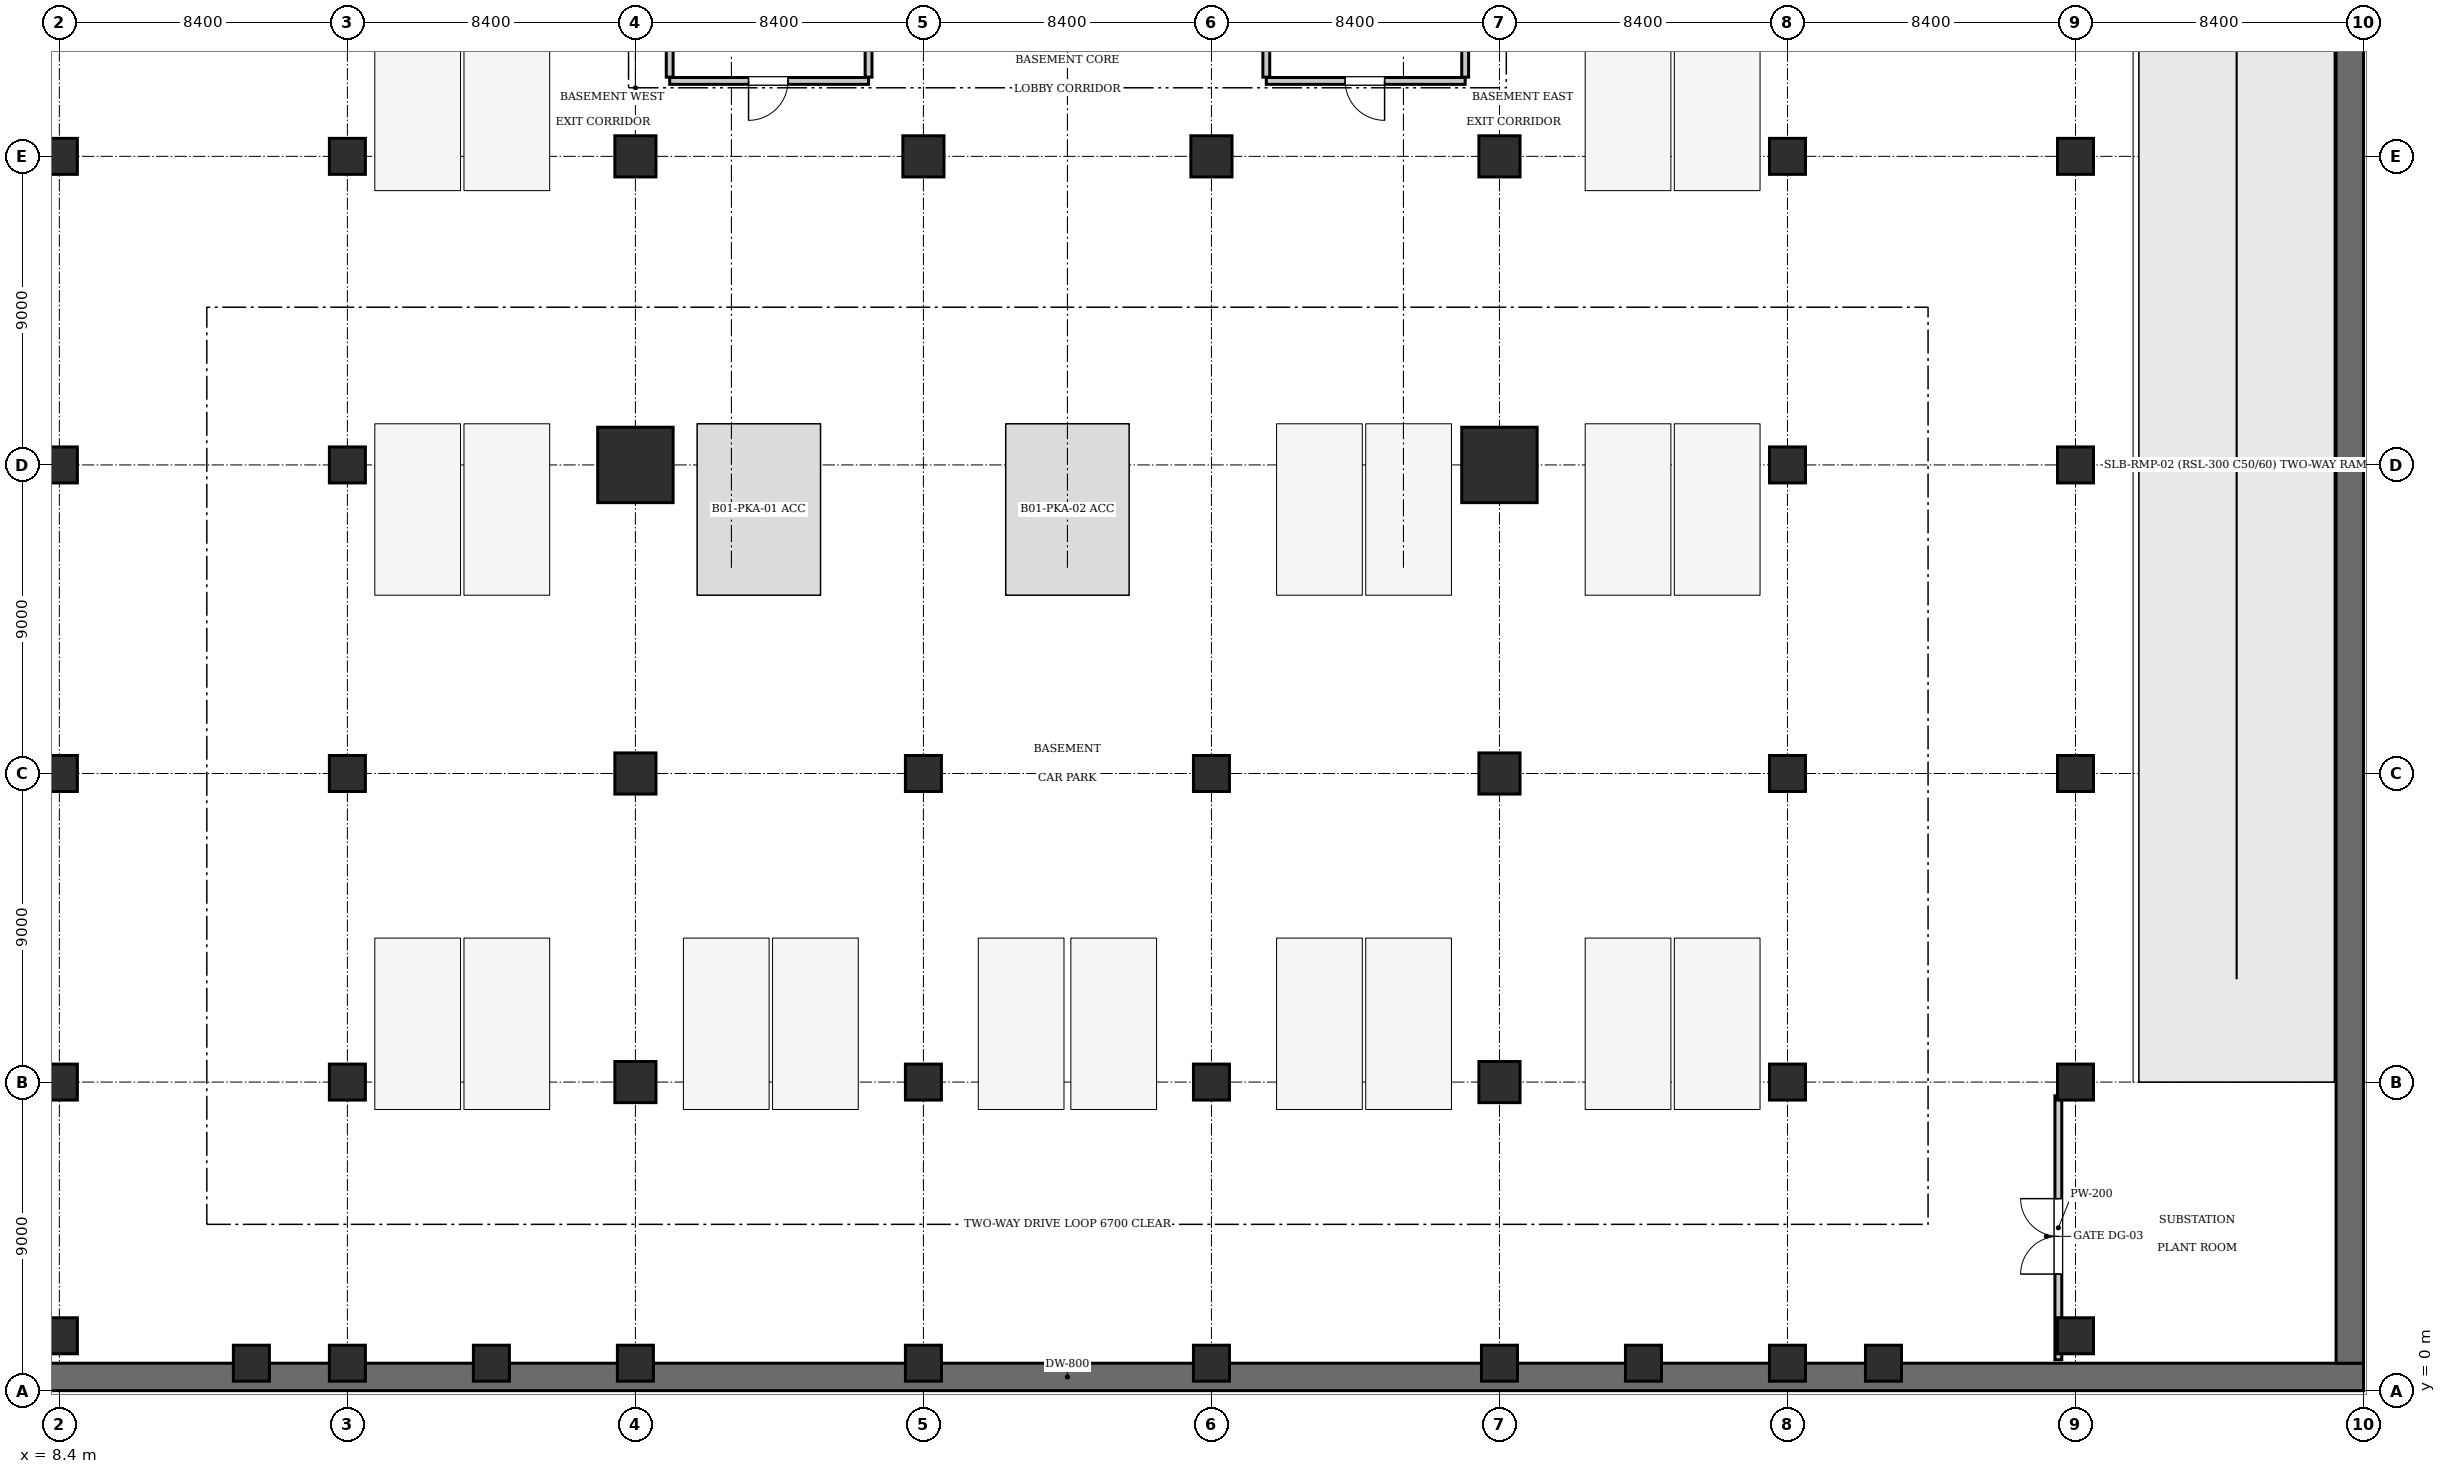
"""IFC4 building model, lengths in metres.
Left out: names, types, materials, properties, quantities, classifications, styles, units other than length and angle.
Written with IfcOpenShell. Run it as: python <this file> out.ifc"""

import sys

from ifc_helpers import new_model, si_unit, direction, frame, frame_2d, origin, origin_2d, place, context, subcontext, project, spatial, rectangle, extrude, element, fill, save


model = new_model("IFC4")
c1 = context("Model", 3, precision=1e-05, world=origin(), true_north=direction((0.0, 1.0)))
c2 = subcontext(c1, "Body", "Model", "MODEL_VIEW")
j1 = project(units=[si_unit("LENGTHUNIT", "METRE"), si_unit("PLANEANGLEUNIT", "RADIAN")], contexts=[c1])
p1 = place(None, origin())
s1 = spatial("IfcSite", under=j1, at=p1, CompositionType="ELEMENT")
p2 = place(p1, origin())
s2 = spatial("IfcBuilding", under=s1, at=p2, CompositionType="ELEMENT")
p3 = place(p2, frame((0.0, 0.0, -5.25)))
s3 = spatial("IfcBuildingStorey", under=s2, at=p3, CompositionType="ELEMENT", Elevation=-5.25)
p4 = place(p3, frame((0.0, 0.4, 0.0), z_axis=(0.0, 0.0, 1.0), x_axis=(1.0, 0.0, 0.0)))
e1 = element("IfcWall", 1, at=p4, inside=s3, PredefinedType="USERDEFINED", context=c2, shape_type="SweptSolid", body=[
    extrude(rectangle(XDim=75.6, YDim=0.8, at=frame_2d((37.8, 0.0))), origin(), (0.0, 0.0, 1.0), 5.25),
])
p5 = place(p3, frame((75.2, 0.8, 0.0), z_axis=(0.0, 0.0, 1.0), x_axis=(0.0, 1.0, 0.0)))
e2 = element("IfcWall", 2, at=p5, inside=s3, PredefinedType="USERDEFINED", context=c2, shape_type="SweptSolid", body=[
    extrude(rectangle(XDim=52.4, YDim=0.8, at=frame_2d((26.2, 0.0))), origin(), (0.0, 0.0, 1.0), 5.25),
])
for number, where, z_axis, x_axis in (
    (3, (25.2, 27.0, 0.0), (0.0, 0.0, 1.0), (1.0, 0.0, 0.0)),
    (4, (50.4, 27.0, 0.0), (0.0, 0.0, 1.0), (1.0, 0.0, 0.0)),
):
    element("IfcColumn", number, at=place(p3, frame(where, z_axis=z_axis, x_axis=x_axis)), inside=s3, PredefinedType="COLUMN", context=c2, shape_type="SweptSolid", body=[
        extrude(rectangle(XDim=2.2, YDim=2.2, at=origin_2d()), origin(), (0.0, 0.0, 1.0), 5.25),
    ])
for number, where, z_axis, x_axis in (
    (5, (25.2, 36.0, 0.0), (0.0, 0.0, 1.0), (1.0, 0.0, 0.0)),
    (6, (33.6, 36.0, 0.0), (0.0, 0.0, 1.0), (1.0, 0.0, 0.0)),
    (7, (42.0, 36.0, 0.0), (0.0, 0.0, 1.0), (1.0, 0.0, 0.0)),
    (8, (50.4, 36.0, 0.0), (0.0, 0.0, 1.0), (1.0, 0.0, 0.0)),
    (9, (25.2, 18.0, 0.0), (0.0, 0.0, 1.0), (1.0, 0.0, 0.0)),
    (10, (50.4, 18.0, 0.0), (0.0, 0.0, 1.0), (1.0, 0.0, 0.0)),
    (11, (25.2, 9.0, 0.0), (0.0, 0.0, 1.0), (1.0, 0.0, 0.0)),
    (12, (50.4, 9.0, 0.0), (0.0, 0.0, 1.0), (1.0, 0.0, 0.0)),
):
    element("IfcColumn", number, at=place(p3, frame(where, z_axis=z_axis, x_axis=x_axis)), inside=s3, PredefinedType="COLUMN", context=c2, shape_type="SweptSolid", body=[
        extrude(rectangle(XDim=1.2, YDim=1.2, at=origin_2d()), origin(), (0.0, 0.0, 1.0), 5.25),
    ])
for number, where, z_axis, x_axis in (
    (13, (33.6, 9.0, 0.0), (0.0, 0.0, 1.0), (1.0, 0.0, 0.0)),
    (14, (42.0, 9.0, 0.0), (0.0, 0.0, 1.0), (1.0, 0.0, 0.0)),
    (15, (33.6, 18.0, 0.0), (0.0, 0.0, 1.0), (1.0, 0.0, 0.0)),
    (16, (42.0, 18.0, 0.0), (0.0, 0.0, 1.0), (1.0, 0.0, 0.0)),
    (17, (16.8, 9.0, 0.0), (0.0, 0.0, 1.0), (1.0, 0.0, 0.0)),
    (18, (58.8, 9.0, 0.0), (0.0, 0.0, 1.0), (1.0, 0.0, 0.0)),
    (19, (16.8, 18.0, 0.0), (0.0, 0.0, 1.0), (1.0, 0.0, 0.0)),
    (20, (58.8, 18.0, 0.0), (0.0, 0.0, 1.0), (1.0, 0.0, 0.0)),
    (21, (16.8, 27.0, 0.0), (0.0, 0.0, 1.0), (1.0, 0.0, 0.0)),
    (22, (58.8, 27.0, 0.0), (0.0, 0.0, 1.0), (1.0, 0.0, 0.0)),
    (23, (16.8, 36.0, 0.0), (0.0, 0.0, 1.0), (1.0, 0.0, 0.0)),
    (24, (58.8, 36.0, 0.0), (0.0, 0.0, 1.0), (1.0, 0.0, 0.0)),
    (25, (8.4, 1.6, 0.0), (0.0, 0.0, 1.0), (1.0, 0.0, 0.0)),
    (26, (67.2, 1.6, 0.0), (0.0, 0.0, 1.0), (1.0, 0.0, 0.0)),
    (27, (8.4, 9.0, 0.0), (0.0, 0.0, 1.0), (1.0, 0.0, 0.0)),
    (28, (67.2, 9.0, 0.0), (0.0, 0.0, 1.0), (1.0, 0.0, 0.0)),
    (29, (8.4, 18.0, 0.0), (0.0, 0.0, 1.0), (1.0, 0.0, 0.0)),
    (30, (67.2, 18.0, 0.0), (0.0, 0.0, 1.0), (1.0, 0.0, 0.0)),
    (31, (8.4, 27.0, 0.0), (0.0, 0.0, 1.0), (1.0, 0.0, 0.0)),
    (32, (67.2, 27.0, 0.0), (0.0, 0.0, 1.0), (1.0, 0.0, 0.0)),
    (33, (8.4, 36.0, 0.0), (0.0, 0.0, 1.0), (1.0, 0.0, 0.0)),
    (34, (67.2, 36.0, 0.0), (0.0, 0.0, 1.0), (1.0, 0.0, 0.0)),
    (35, (16.8, 0.8, 0.0), (0.0, 0.0, 1.0), (1.0, 0.0, 0.0)),
    (36, (25.2, 0.8, 0.0), (0.0, 0.0, 1.0), (1.0, 0.0, 0.0)),
    (37, (33.6, 0.8, 0.0), (0.0, 0.0, 1.0), (1.0, 0.0, 0.0)),
    (38, (42.0, 0.8, 0.0), (0.0, 0.0, 1.0), (1.0, 0.0, 0.0)),
    (39, (50.4, 0.8, 0.0), (0.0, 0.0, 1.0), (1.0, 0.0, 0.0)),
    (40, (58.8, 0.8, 0.0), (0.0, 0.0, 1.0), (1.0, 0.0, 0.0)),
    (41, (14.0, 0.8, 0.0), (0.0, 0.0, 1.0), (1.0, 0.0, 0.0)),
    (42, (21.0, 0.8, 0.0), (0.0, 0.0, 1.0), (1.0, 0.0, 0.0)),
    (43, (54.6, 0.8, 0.0), (0.0, 0.0, 1.0), (1.0, 0.0, 0.0)),
    (44, (61.6, 0.8, 0.0), (0.0, 0.0, 1.0), (1.0, 0.0, 0.0)),
):
    element("IfcColumn", number, at=place(p3, frame(where, z_axis=z_axis, x_axis=x_axis)), inside=s3, PredefinedType="COLUMN", context=c2, shape_type="SweptSolid", body=[
        extrude(rectangle(XDim=1.05, YDim=1.05, at=origin_2d()), origin(), (0.0, 0.0, 1.0), 5.25),
    ])
p6 = place(p3, frame((26.2, 38.2, 0.0), z_axis=(0.0, 0.0, 1.0), x_axis=(1.0, 0.0, 0.0)))
e45 = element("IfcWall", 45, at=p6, inside=s3, PredefinedType="PARTITIONING", context=c2, shape_type="SweptSolid", body=[
    extrude(rectangle(XDim=5.8, YDim=0.2, at=frame_2d((2.9, 0.0))), origin(), (0.0, 0.0, 1.0), 4.97),
])
p7 = place(p6, frame((2.3, 0.0, 0.0)))
e46 = element("IfcOpeningElement", 46, at=p7, cuts=e45, PredefinedType="OPENING", context=c2, shape_type="SweptSolid", body=[
    extrude(rectangle(XDim=1.15, YDim=2.15, at=frame_2d((0.575, 1.075))), frame((0.0, 0.11, 0.0), z_axis=(0.0, -1.0, 0.0), x_axis=(1.0, 0.0, 0.0)), (0.0, 0.0, 1.0), 0.22),
])
for number, where, z_axis, x_axis in (
    (47, (26.2, 38.31, 0.0), (0.0, 0.0, 1.0), (0.0, 1.0, 0.0)),
    (48, (32.0, 38.31, 0.0), (0.0, 0.0, 1.0), (0.0, 1.0, 0.0)),
):
    element("IfcWall", number, at=place(p3, frame(where, z_axis=z_axis, x_axis=x_axis)), inside=s3, PredefinedType="PARTITIONING", context=c2, shape_type="SweptSolid", body=[
        extrude(rectangle(XDim=3.07, YDim=0.2, at=frame_2d((1.535, 0.0))), origin(), (0.0, 0.0, 1.0), 4.97),
    ])
p8 = place(p3, frame((43.6, 38.2, 0.0), z_axis=(0.0, 0.0, 1.0), x_axis=(1.0, 0.0, 0.0)))
e49 = element("IfcWall", 49, at=p8, inside=s3, PredefinedType="PARTITIONING", context=c2, shape_type="SweptSolid", body=[
    extrude(rectangle(XDim=5.8, YDim=0.2, at=frame_2d((2.9, 0.0))), origin(), (0.0, 0.0, 1.0), 4.97),
])
p9 = place(p8, frame((2.3, 0.0, 0.0)))
e50 = element("IfcOpeningElement", 50, at=p9, cuts=e49, PredefinedType="OPENING", context=c2, shape_type="SweptSolid", body=[
    extrude(rectangle(XDim=1.15, YDim=2.15, at=frame_2d((0.575, 1.075))), frame((0.0, 0.11, 0.0), z_axis=(0.0, -1.0, 0.0), x_axis=(1.0, 0.0, 0.0)), (0.0, 0.0, 1.0), 0.22),
])
for number, where, z_axis, x_axis in (
    (51, (43.6, 38.31, 0.0), (0.0, 0.0, 1.0), (0.0, 1.0, 0.0)),
    (52, (49.4, 38.31, 0.0), (0.0, 0.0, 1.0), (0.0, 1.0, 0.0)),
):
    element("IfcWall", number, at=place(p3, frame(where, z_axis=z_axis, x_axis=x_axis)), inside=s3, PredefinedType="PARTITIONING", context=c2, shape_type="SweptSolid", body=[
        extrude(rectangle(XDim=3.07, YDim=0.2, at=frame_2d((1.535, 0.0))), origin(), (0.0, 0.0, 1.0), 4.97),
    ])
p10 = place(p3, frame((66.7, 0.9, 0.0), z_axis=(0.0, 0.0, 1.0), x_axis=(0.0, 1.0, 0.0)))
e53 = element("IfcWall", 53, at=p10, inside=s3, PredefinedType="PARTITIONING", context=c2, shape_type="SweptSolid", body=[
    extrude(rectangle(XDim=7.7, YDim=0.2, at=frame_2d((3.85, 0.0))), origin(), (0.0, 0.0, 1.0), 4.97),
])
p11 = place(p10, frame((2.5, 0.0, 0.0)))
e54 = element("IfcOpeningElement", 54, at=p11, cuts=e53, PredefinedType="OPENING", context=c2, shape_type="SweptSolid", body=[
    extrude(rectangle(XDim=2.2, YDim=2.4, at=frame_2d((1.1, 1.2))), frame((0.0, 0.11, 0.0), z_axis=(0.0, -1.0, 0.0), x_axis=(1.0, 0.0, 0.0)), (0.0, 0.0, 1.0), 0.22),
])
p12 = place(p7, frame((1.15, 0.0, 0.0), z_axis=(0.0, 0.0, 1.0), x_axis=(-1.0, 0.0, 0.0)))
e55 = element("IfcDoor", 55, at=p12, inside=s3, OperationType="SINGLE_SWING_RIGHT", PredefinedType="DOOR", context=c2, shape_type="SweptSolid", body=[
    extrude(rectangle(XDim=1.15, YDim=2.15, at=frame_2d((0.575, 1.075))), frame((0.0, 0.025, 0.0), z_axis=(0.0, -1.0, 0.0), x_axis=(1.0, 0.0, 0.0)), (0.0, 0.0, 1.0), 0.05),
])
fill(e46, e55)
p13 = place(p9, frame((1.15, 0.0, 0.0), z_axis=(0.0, 0.0, 1.0), x_axis=(-1.0, 0.0, 0.0)))
e56 = element("IfcDoor", 56, at=p13, inside=s3, OperationType="SINGLE_SWING_LEFT", PredefinedType="DOOR", context=c2, shape_type="SweptSolid", body=[
    extrude(rectangle(XDim=1.15, YDim=2.15, at=frame_2d((0.575, 1.075))), frame((0.0, 0.025, 0.0), z_axis=(0.0, -1.0, 0.0), x_axis=(1.0, 0.0, 0.0)), (0.0, 0.0, 1.0), 0.05),
])
fill(e50, e56)
p14 = place(p11, origin())
e57 = element("IfcDoor", 57, at=p14, inside=s3, OperationType="DOUBLE_DOOR_SINGLE_SWING", PredefinedType="GATE", context=c2, shape_type="SweptSolid", body=[
    extrude(rectangle(XDim=2.2, YDim=2.4, at=frame_2d((1.1, 1.2))), frame((0.0, 0.025, 0.0), z_axis=(0.0, -1.0, 0.0), x_axis=(1.0, 0.0, 0.0)), (0.0, 0.0, 1.0), 0.05),
])
fill(e54, e57)
save(model, sys.argv[1])
